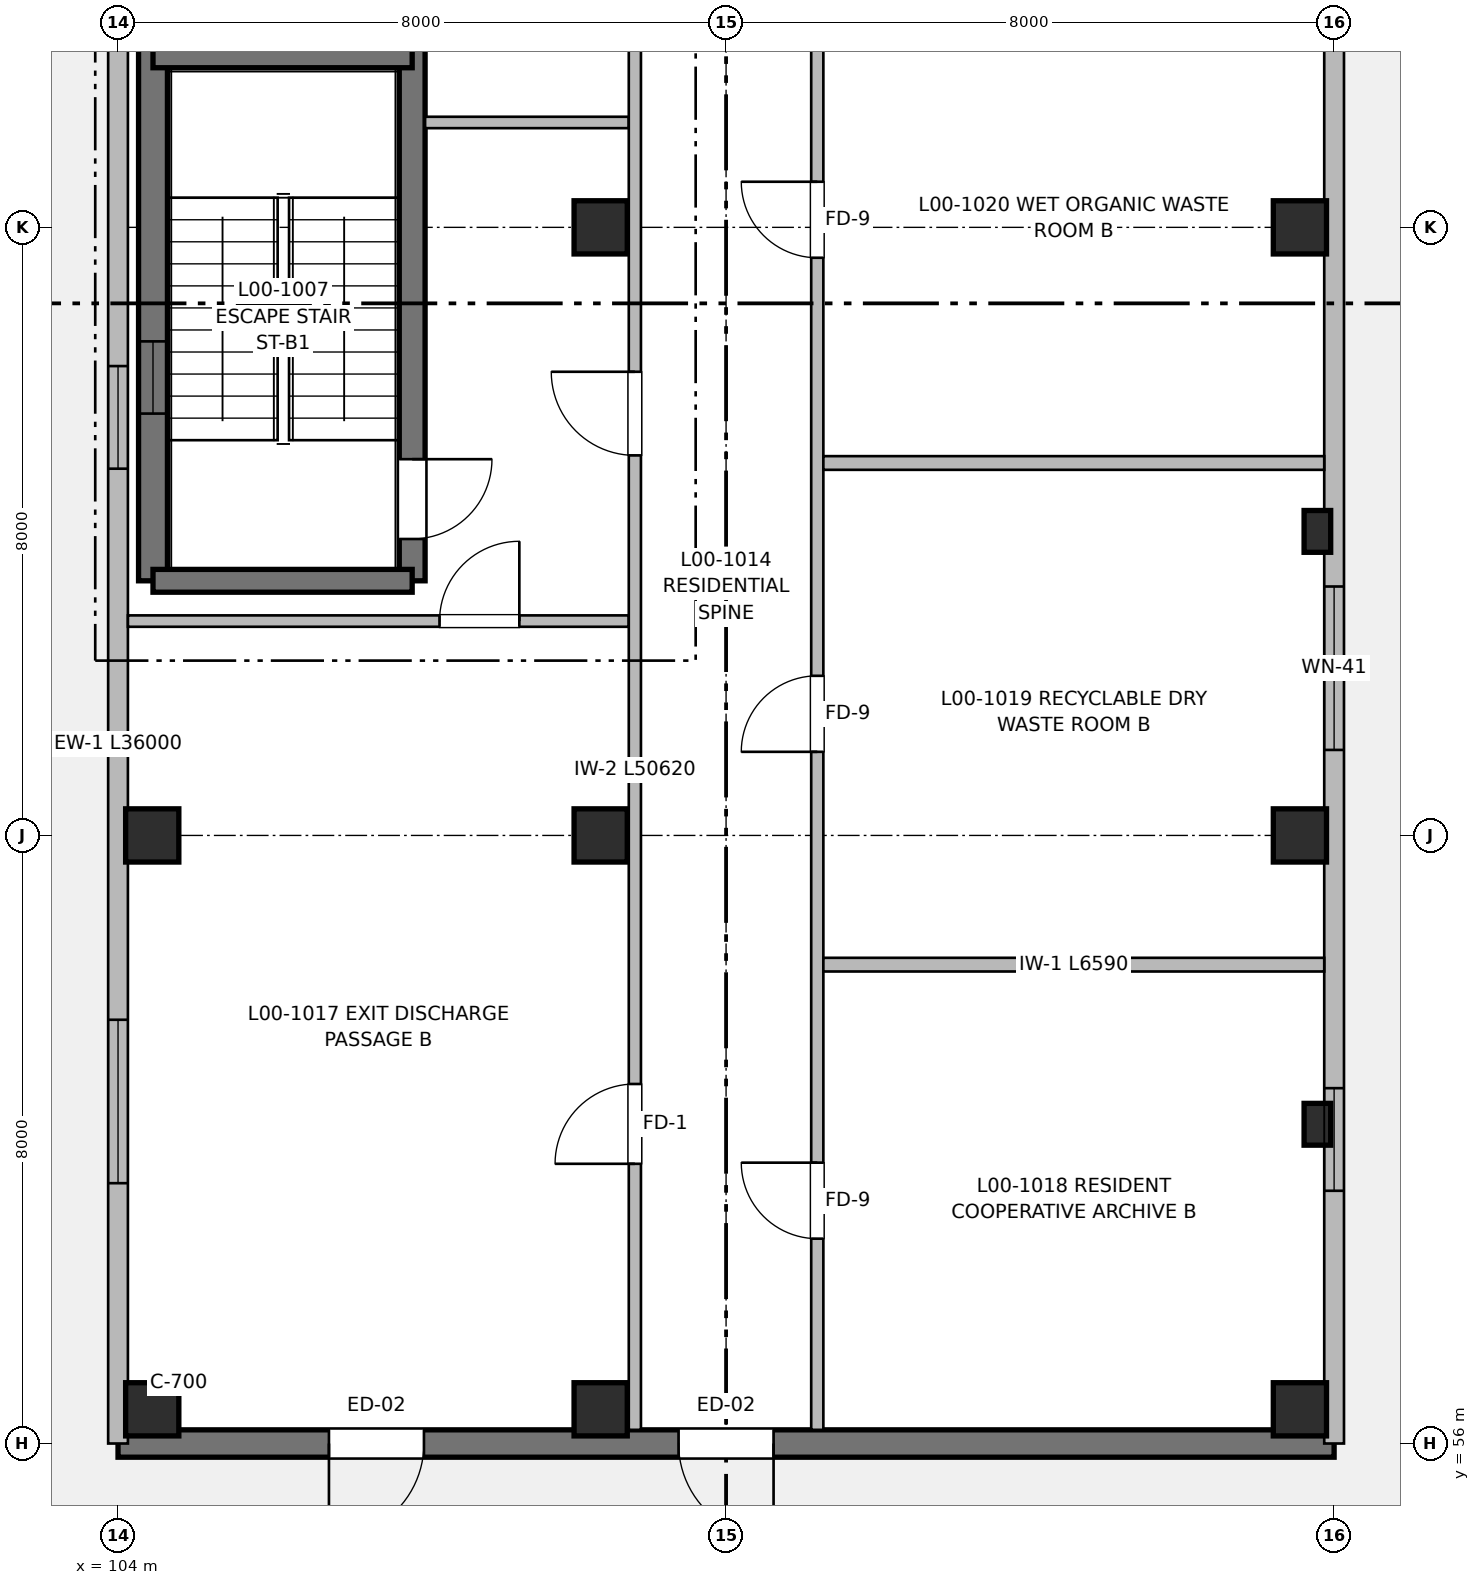
"""IFC4 building model, lengths in metres.
Left out: names, types, materials, properties, quantities, classifications, styles, units other than length and angle.
Written with IfcOpenShell. Run it as: python <this file> out.ifc"""

import sys

from ifc_helpers import new_model, si_unit, direction, frame, frame_2d, origin, origin_2d, place, context, subcontext, project, spatial, rectangle, extrude, element, fill, save


model = new_model("IFC4")
c1 = context("Model", 3, precision=1e-05, world=origin(), true_north=direction((0.0, 1.0)))
c2 = subcontext(c1, "Body", "Model", "MODEL_VIEW")
j1 = project(units=[si_unit("LENGTHUNIT", "METRE"), si_unit("PLANEANGLEUNIT", "RADIAN")], contexts=[c1])
p1 = place(None, origin())
s1 = spatial("IfcSite", under=j1, at=p1, CompositionType="ELEMENT")
p2 = place(p1, origin())
s2 = spatial("IfcBuilding", under=s1, at=p2, CompositionType="ELEMENT")
p3 = place(p2, origin())
s3 = spatial("IfcBuildingStorey", under=s2, at=p3, CompositionType="ELEMENT", Elevation=0.0)
for number, where, z_axis, x_axis in (
    (1, (104.45, 56.45, 0.0), (0.0, 0.0, 1.0), (1.0, 0.0, 0.0)),
    (2, (104.45, 64.0, 0.0), (0.0, 0.0, 1.0), (1.0, 0.0, 0.0)),
    (3, (110.35, 56.45, 0.0), (0.0, 0.0, 1.0), (1.0, 0.0, 0.0)),
    (4, (110.35, 64.0, 0.0), (0.0, 0.0, 1.0), (1.0, 0.0, 0.0)),
    (5, (110.35, 72.0, 0.0), (0.0, 0.0, 1.0), (1.0, 0.0, 0.0)),
    (6, (119.55, 56.45, 0.0), (0.0, 0.0, 1.0), (1.0, 0.0, 0.0)),
    (7, (119.55, 64.0, 0.0), (0.0, 0.0, 1.0), (1.0, 0.0, 0.0)),
    (8, (119.55, 72.0, 0.0), (0.0, 0.0, 1.0), (1.0, 0.0, 0.0)),
):
    element("IfcColumn", number, at=place(p3, frame(where, z_axis=z_axis, x_axis=x_axis)), inside=s3, PredefinedType="COLUMN", context=c2, shape_type="SweptSolid", body=[
        extrude(rectangle(XDim=0.7, YDim=0.7, at=origin_2d()), origin(), (0.0, 0.0, 1.0), 4.16),
    ])
for number, where, z_axis, x_axis in (
    (9, (119.78, 60.2, 0.0), (0.0, 0.0, 1.0), (1.0, 0.0, 0.0)),
    (10, (119.78, 68.0, 0.0), (0.0, 0.0, 1.0), (1.0, 0.0, 0.0)),
):
    element("IfcColumn", number, at=place(p3, frame(where, z_axis=z_axis, x_axis=x_axis)), inside=s3, PredefinedType="PILASTER", context=c2, shape_type="SweptSolid", body=[
        extrude(rectangle(XDim=0.35, YDim=0.55, at=origin_2d()), origin(), (0.0, 0.0, 1.0), 4.16),
    ])
p4 = place(p3, frame((104.46, 67.35, 0.0), z_axis=(0.0, 0.0, 1.0), x_axis=(0.0, 1.0, 0.0)))
e11 = element("IfcWall", 11, at=p4, inside=s3, PredefinedType="SHEAR", context=c2, shape_type="SweptSolid", body=[
    extrude(rectangle(XDim=12.45, YDim=0.38, at=frame_2d((6.225, 0.0))), origin(), (0.0, 0.0, 1.0), 4.16),
])
p5 = place(p4, frame((2.2, 0.0, 1.2)))
e12 = element("IfcOpeningElement", 12, at=p5, cuts=e11, PredefinedType="OPENING", context=c2, shape_type="SweptSolid", body=[
    extrude(rectangle(XDim=0.95, YDim=1.25, at=frame_2d((0.475, 0.625))), frame((0.0, 0.2, 0.0), z_axis=(0.0, -1.0, 0.0), x_axis=(1.0, 0.0, 0.0)), (0.0, 0.0, 1.0), 0.4),
])
p6 = place(p3, frame((107.87, 79.8, 0.0), z_axis=(0.0, 0.0, 1.0), x_axis=(0.0, -1.0, 0.0)))
e13 = element("IfcWall", 13, at=p6, inside=s3, PredefinedType="SHEAR", context=c2, shape_type="SweptSolid", body=[
    extrude(rectangle(XDim=12.45, YDim=0.34, at=frame_2d((6.225, 0.0))), origin(), (0.0, 0.0, 1.0), 4.16),
])
p7 = place(p6, frame((10.85, 0.0, 0.0)))
e14 = element("IfcOpeningElement", 14, at=p7, cuts=e13, PredefinedType="OPENING", context=c2, shape_type="SweptSolid", body=[
    extrude(rectangle(XDim=1.05, YDim=2.15, at=frame_2d((0.525, 1.075))), frame((0.0, 0.18, 0.0), z_axis=(0.0, -1.0, 0.0), x_axis=(1.0, 0.0, 0.0)), (0.0, 0.0, 1.0), 0.36),
])
p8 = place(p3, frame((107.87, 67.35, 0.0), z_axis=(0.0, 0.0, 1.0), x_axis=(-1.0, 0.0, 0.0)))
e15 = element("IfcWall", 15, at=p8, inside=s3, PredefinedType="SHEAR", context=c2, shape_type="SweptSolid", body=[
    extrude(rectangle(XDim=3.41, YDim=0.3, at=frame_2d((1.705, 0.0))), origin(), (0.0, 0.0, 1.0), 4.16),
])
p9 = place(p3, frame((104.46, 74.24, 0.0), z_axis=(0.0, 0.0, 1.0), x_axis=(1.0, 0.0, 0.0)))
e16 = element("IfcWall", 16, at=p9, inside=s3, PredefinedType="SHEAR", context=c2, shape_type="SweptSolid", body=[
    extrude(rectangle(XDim=3.41, YDim=0.28, at=frame_2d((1.705, 0.0))), origin(), (0.0, 0.0, 1.0), 4.16),
])
p10 = place(p3, frame((120.0, 56.0, 0.0), z_axis=(0.0, 0.0, 1.0), x_axis=(-1.0, 0.0, 0.0)))
e17 = element("IfcWall", 17, at=p10, inside=s3, PredefinedType="SHEAR", context=c2, shape_type="SweptSolid", body=[
    extrude(rectangle(XDim=16.0, YDim=0.36, at=frame_2d((8.0, 0.0))), origin(), (0.0, 0.0, 1.0), 3.94),
])
p11 = place(p10, frame((7.375, 0.0, 0.0)))
e18 = element("IfcOpeningElement", 18, at=p11, cuts=e17, PredefinedType="OPENING", context=c2, shape_type="SweptSolid", body=[
    extrude(rectangle(XDim=1.25, YDim=2.2, at=frame_2d((0.625, 1.1))), frame((0.0, 0.19, 0.0), z_axis=(0.0, -1.0, 0.0), x_axis=(1.0, 0.0, 0.0)), (0.0, 0.0, 1.0), 0.38),
])
p12 = place(p10, frame((11.975, 0.0, 0.0)))
e19 = element("IfcOpeningElement", 19, at=p12, cuts=e17, PredefinedType="OPENING", context=c2, shape_type="SweptSolid", body=[
    extrude(rectangle(XDim=1.25, YDim=2.2, at=frame_2d((0.625, 1.1))), frame((0.0, 0.19, 0.0), z_axis=(0.0, -1.0, 0.0), x_axis=(1.0, 0.0, 0.0)), (0.0, 0.0, 1.0), 0.38),
])
p13 = place(p3, frame((120.0, 88.0, 0.0), z_axis=(0.0, 0.0, 1.0), x_axis=(0.0, -1.0, 0.0)))
e20 = element("IfcWall", 20, at=p13, inside=s3, PredefinedType="SOLIDWALL", context=c2, shape_type="SweptSolid", body=[
    extrude(rectangle(XDim=32.0, YDim=0.26, at=frame_2d((16.0, 0.0))), origin(), (0.0, 0.0, 1.0), 3.94),
])
p14 = place(p13, frame((4.9, 0.0, 0.0)))
e21 = element("IfcOpeningElement", 21, at=p14, cuts=e20, PredefinedType="OPENING", context=c2, shape_type="SweptSolid", body=[
    extrude(rectangle(XDim=1.3, YDim=2.2, at=frame_2d((0.65, 1.1))), frame((0.0, 0.14, 0.0), z_axis=(0.0, -1.0, 0.0), x_axis=(1.0, 0.0, 0.0)), (0.0, 0.0, 1.0), 0.28),
])
p15 = place(p13, frame((10.025, 0.0, 0.95)))
e22 = element("IfcOpeningElement", 22, at=p15, cuts=e20, PredefinedType="OPENING", context=c2, shape_type="SweptSolid", body=[
    extrude(rectangle(XDim=1.35, YDim=1.3, at=frame_2d((0.675, 0.65))), frame((0.0, 0.14, 0.0), z_axis=(0.0, -1.0, 0.0), x_axis=(1.0, 0.0, 0.0)), (0.0, 0.0, 1.0), 0.28),
])
p16 = place(p13, frame((20.725, 0.0, 0.95)))
e23 = element("IfcOpeningElement", 23, at=p16, cuts=e20, PredefinedType="OPENING", context=c2, shape_type="SweptSolid", body=[
    extrude(rectangle(XDim=2.15, YDim=1.8, at=frame_2d((1.075, 0.9))), frame((0.0, 0.14, 0.0), z_axis=(0.0, -1.0, 0.0), x_axis=(1.0, 0.0, 0.0)), (0.0, 0.0, 1.0), 0.28),
])
p17 = place(p13, frame((27.325, 0.0, 0.95)))
e24 = element("IfcOpeningElement", 24, at=p17, cuts=e20, PredefinedType="OPENING", context=c2, shape_type="SweptSolid", body=[
    extrude(rectangle(XDim=1.35, YDim=1.3, at=frame_2d((0.675, 0.65))), frame((0.0, 0.14, 0.0), z_axis=(0.0, -1.0, 0.0), x_axis=(1.0, 0.0, 0.0)), (0.0, 0.0, 1.0), 0.28),
])
p18 = place(p3, frame((104.0, 56.0, 0.0), z_axis=(0.0, 0.0, 1.0), x_axis=(0.0, 1.0, 0.0)))
e25 = element("IfcWall", 25, at=p18, inside=s3, PredefinedType="SOLIDWALL", context=c2, shape_type="SweptSolid", body=[
    extrude(rectangle(XDim=36.0, YDim=0.26, at=frame_2d((18.0, 0.0))), origin(), (0.0, 0.0, 1.0), 3.94),
])
p19 = place(p18, frame((3.425, 0.0, 0.95)))
e26 = element("IfcOpeningElement", 26, at=p19, cuts=e25, PredefinedType="OPENING", context=c2, shape_type="SweptSolid", body=[
    extrude(rectangle(XDim=2.15, YDim=1.8, at=frame_2d((1.075, 0.9))), frame((0.0, 0.14, 0.0), z_axis=(0.0, -1.0, 0.0), x_axis=(1.0, 0.0, 0.0)), (0.0, 0.0, 1.0), 0.28),
])
p20 = place(p18, frame((12.825, 0.0, 0.95)))
e27 = element("IfcOpeningElement", 27, at=p20, cuts=e25, PredefinedType="OPENING", context=c2, shape_type="SweptSolid", body=[
    extrude(rectangle(XDim=1.35, YDim=1.3, at=frame_2d((0.675, 0.65))), frame((0.0, 0.14, 0.0), z_axis=(0.0, -1.0, 0.0), x_axis=(1.0, 0.0, 0.0)), (0.0, 0.0, 1.0), 0.28),
])
p21 = place(p18, frame((19.075, 0.0, 0.95)))
e28 = element("IfcOpeningElement", 28, at=p21, cuts=e25, PredefinedType="OPENING", context=c2, shape_type="SweptSolid", body=[
    extrude(rectangle(XDim=2.15, YDim=1.8, at=frame_2d((1.075, 0.9))), frame((0.0, 0.14, 0.0), z_axis=(0.0, -1.0, 0.0), x_axis=(1.0, 0.0, 0.0)), (0.0, 0.0, 1.0), 0.28),
])
p22 = place(p18, frame((30.825, 0.0, 0.95)))
e29 = element("IfcOpeningElement", 29, at=p22, cuts=e25, PredefinedType="OPENING", context=c2, shape_type="SweptSolid", body=[
    extrude(rectangle(XDim=1.35, YDim=1.3, at=frame_2d((0.675, 0.65))), frame((0.0, 0.14, 0.0), z_axis=(0.0, -1.0, 0.0), x_axis=(1.0, 0.0, 0.0)), (0.0, 0.0, 1.0), 0.28),
])
p23 = place(p3, frame((104.13, 66.82, 0.0), z_axis=(0.0, 0.0, 1.0), x_axis=(1.0, 0.0, 0.0)))
e30 = element("IfcWall", 30, at=p23, inside=s3, PredefinedType="PARTITIONING", context=c2, shape_type="SweptSolid", body=[
    extrude(rectangle(XDim=6.59, YDim=0.15, at=frame_2d((3.295, 0.0))), origin(), (0.0, 0.0, 1.0), 3.895),
])
p24 = place(p23, frame((4.1, 0.0, 0.0)))
e31 = element("IfcOpeningElement", 31, at=p24, cuts=e30, PredefinedType="OPENING", context=c2, shape_type="SweptSolid", body=[
    extrude(rectangle(XDim=1.05, YDim=2.15, at=frame_2d((0.525, 1.075))), frame((0.0, 0.085, 0.0), z_axis=(0.0, -1.0, 0.0), x_axis=(1.0, 0.0, 0.0)), (0.0, 0.0, 1.0), 0.17),
])
p25 = place(p3, frame((108.04, 73.38, 0.0), z_axis=(0.0, 0.0, 1.0), x_axis=(1.0, 0.0, 0.0)))
e32 = element("IfcWall", 32, at=p25, inside=s3, PredefinedType="PARTITIONING", context=c2, shape_type="SweptSolid", body=[
    extrude(rectangle(XDim=2.68, YDim=0.15, at=frame_2d((1.34, 0.0))), origin(), (0.0, 0.0, 1.0), 3.895),
])
p26 = place(p3, frame((110.8, 56.18, 0.0), z_axis=(0.0, 0.0, 1.0), x_axis=(0.0, 1.0, 0.0)))
e33 = element("IfcWall", 33, at=p26, inside=s3, PredefinedType="PARTITIONING", context=c2, shape_type="SweptSolid", body=[
    extrude(rectangle(XDim=50.62, YDim=0.16, at=frame_2d((25.31, 0.0))), origin(), (0.0, 0.0, 1.0), 3.895),
])
p27 = place(p26, frame((12.82, 0.0, 0.0)))
e34 = element("IfcOpeningElement", 34, at=p27, cuts=e33, PredefinedType="OPENING", context=c2, shape_type="SweptSolid", body=[
    extrude(rectangle(XDim=1.1, YDim=2.15, at=frame_2d((0.55, 1.075))), frame((0.0, 0.09, 0.0), z_axis=(0.0, -1.0, 0.0), x_axis=(1.0, 0.0, 0.0)), (0.0, 0.0, 1.0), 0.18),
])
p28 = place(p26, frame((19.22, 0.0, 0.0)))
e35 = element("IfcOpeningElement", 35, at=p28, cuts=e33, PredefinedType="OPENING", context=c2, shape_type="SweptSolid", body=[
    extrude(rectangle(XDim=1.6, YDim=2.15, at=frame_2d((0.8, 1.075))), frame((0.0, 0.09, 0.0), z_axis=(0.0, -1.0, 0.0), x_axis=(1.0, 0.0, 0.0)), (0.0, 0.0, 1.0), 0.18),
])
p29 = place(p26, frame((3.5, 0.0, 0.0)))
e36 = element("IfcOpeningElement", 36, at=p29, cuts=e33, PredefinedType="OPENING", context=c2, shape_type="SweptSolid", body=[
    extrude(rectangle(XDim=1.05, YDim=2.15, at=frame_2d((0.525, 1.075))), frame((0.0, 0.09, 0.0), z_axis=(0.0, -1.0, 0.0), x_axis=(1.0, 0.0, 0.0)), (0.0, 0.0, 1.0), 0.18),
])
p30 = place(p26, frame((29.2, 0.0, 0.0)))
e37 = element("IfcOpeningElement", 37, at=p30, cuts=e33, PredefinedType="OPENING", context=c2, shape_type="SweptSolid", body=[
    extrude(rectangle(XDim=1.55, YDim=2.2, at=frame_2d((0.775, 1.1))), frame((0.0, 0.09, 0.0), z_axis=(0.0, -1.0, 0.0), x_axis=(1.0, 0.0, 0.0)), (0.0, 0.0, 1.0), 0.18),
])
p31 = place(p3, frame((113.2, 56.18, 0.0), z_axis=(0.0, 0.0, 1.0), x_axis=(0.0, 1.0, 0.0)))
e38 = element("IfcWall", 38, at=p31, inside=s3, PredefinedType="PARTITIONING", context=c2, shape_type="SweptSolid", body=[
    extrude(rectangle(XDim=50.62, YDim=0.16, at=frame_2d((25.31, 0.0))), origin(), (0.0, 0.0, 1.0), 3.895),
])
p32 = place(p31, frame((2.515, 0.0, 0.0)))
e39 = element("IfcOpeningElement", 39, at=p32, cuts=e38, PredefinedType="OPENING", context=c2, shape_type="SweptSolid", body=[
    extrude(rectangle(XDim=1.0, YDim=2.1, at=frame_2d((0.5, 1.05))), frame((0.0, 0.09, 0.0), z_axis=(0.0, -1.0, 0.0), x_axis=(1.0, 0.0, 0.0)), (0.0, 0.0, 1.0), 0.18),
])
p33 = place(p31, frame((8.92, 0.0, 0.0)))
e40 = element("IfcOpeningElement", 40, at=p33, cuts=e38, PredefinedType="OPENING", context=c2, shape_type="SweptSolid", body=[
    extrude(rectangle(XDim=1.0, YDim=2.1, at=frame_2d((0.5, 1.05))), frame((0.0, 0.09, 0.0), z_axis=(0.0, -1.0, 0.0), x_axis=(1.0, 0.0, 0.0)), (0.0, 0.0, 1.0), 0.18),
])
p34 = place(p31, frame((15.42, 0.0, 0.0)))
e41 = element("IfcOpeningElement", 41, at=p34, cuts=e38, PredefinedType="OPENING", context=c2, shape_type="SweptSolid", body=[
    extrude(rectangle(XDim=1.0, YDim=2.1, at=frame_2d((0.5, 1.05))), frame((0.0, 0.09, 0.0), z_axis=(0.0, -1.0, 0.0), x_axis=(1.0, 0.0, 0.0)), (0.0, 0.0, 1.0), 0.18),
])
p35 = place(p31, frame((24.42, 0.0, 0.0)))
e42 = element("IfcOpeningElement", 42, at=p35, cuts=e38, PredefinedType="OPENING", context=c2, shape_type="SweptSolid", body=[
    extrude(rectangle(XDim=0.96, YDim=2.15, at=frame_2d((0.48, 1.075))), frame((0.0, 0.09, 0.0), z_axis=(0.0, -1.0, 0.0), x_axis=(1.0, 0.0, 0.0)), (0.0, 0.0, 1.0), 0.18),
])
p36 = place(p31, frame((40.175, 0.0, 0.0)))
e43 = element("IfcOpeningElement", 43, at=p36, cuts=e38, PredefinedType="OPENING", context=c2, shape_type="SweptSolid", body=[
    extrude(rectangle(XDim=1.04, YDim=2.15, at=frame_2d((0.52, 1.075))), frame((0.0, 0.09, 0.0), z_axis=(0.0, -1.0, 0.0), x_axis=(1.0, 0.0, 0.0)), (0.0, 0.0, 1.0), 0.18),
])
for number, where, z_axis, x_axis in (
    (44, (113.28, 62.3, 0.0), (0.0, 0.0, 1.0), (1.0, 0.0, 0.0)),
    (45, (113.28, 68.9, 0.0), (0.0, 0.0, 1.0), (1.0, 0.0, 0.0)),
):
    element("IfcWall", number, at=place(p3, frame(where, z_axis=z_axis, x_axis=x_axis)), inside=s3, PredefinedType="PARTITIONING", context=c2, shape_type="SweptSolid", body=[
        extrude(rectangle(XDim=6.59, YDim=0.18, at=frame_2d((3.295, 0.0))), origin(), (0.0, 0.0, 1.0), 3.895),
    ])
p37 = place(p7, origin())
e46 = element("IfcDoor", 46, at=p37, inside=s3, OperationType="SINGLE_SWING_LEFT", PredefinedType="DOOR", context=c2, shape_type="SweptSolid", body=[
    extrude(rectangle(XDim=1.05, YDim=2.15, at=frame_2d((0.525, 1.075))), frame((0.0, 0.025, 0.0), z_axis=(0.0, -1.0, 0.0), x_axis=(1.0, 0.0, 0.0)), (0.0, 0.0, 1.0), 0.05),
])
fill(e14, e46)
p38 = place(p5, origin())
e47 = element("IfcWindow", 47, at=p38, inside=s3, PartitioningType="SINGLE_PANEL", PredefinedType="WINDOW", context=c2, shape_type="SweptSolid", body=[
    extrude(rectangle(XDim=0.95, YDim=1.25, at=frame_2d((0.475, 0.625))), frame((0.0, 0.03, 0.0), z_axis=(0.0, -1.0, 0.0), x_axis=(1.0, 0.0, 0.0)), (0.0, 0.0, 1.0), 0.06),
])
fill(e12, e47)
p39 = place(p11, origin())
e48 = element("IfcDoor", 48, at=p39, inside=s3, OperationType="SINGLE_SWING_LEFT", PredefinedType="DOOR", context=c2, shape_type="SweptSolid", body=[
    extrude(rectangle(XDim=1.25, YDim=2.2, at=frame_2d((0.625, 1.1))), frame((0.0, 0.025, 0.0), z_axis=(0.0, -1.0, 0.0), x_axis=(1.0, 0.0, 0.0)), (0.0, 0.0, 1.0), 0.05),
])
fill(e18, e48)
p40 = place(p12, origin())
e49 = element("IfcDoor", 49, at=p40, inside=s3, OperationType="SINGLE_SWING_RIGHT", PredefinedType="DOOR", context=c2, shape_type="SweptSolid", body=[
    extrude(rectangle(XDim=1.25, YDim=2.2, at=frame_2d((0.625, 1.1))), frame((0.0, 0.025, 0.0), z_axis=(0.0, -1.0, 0.0), x_axis=(1.0, 0.0, 0.0)), (0.0, 0.0, 1.0), 0.05),
])
fill(e19, e49)
p41 = place(p16, origin())
e50 = element("IfcWindow", 50, at=p41, inside=s3, PartitioningType="SINGLE_PANEL", PredefinedType="WINDOW", context=c2, shape_type="SweptSolid", body=[
    extrude(rectangle(XDim=2.15, YDim=1.8, at=frame_2d((1.075, 0.9))), frame((0.0, 0.03, 0.0), z_axis=(0.0, -1.0, 0.0), x_axis=(1.0, 0.0, 0.0)), (0.0, 0.0, 1.0), 0.06),
])
fill(e23, e50)
p42 = place(p17, origin())
e51 = element("IfcWindow", 51, at=p42, inside=s3, PartitioningType="SINGLE_PANEL", PredefinedType="WINDOW", context=c2, shape_type="SweptSolid", body=[
    extrude(rectangle(XDim=1.35, YDim=1.3, at=frame_2d((0.675, 0.65))), frame((0.0, 0.03, 0.0), z_axis=(0.0, -1.0, 0.0), x_axis=(1.0, 0.0, 0.0)), (0.0, 0.0, 1.0), 0.06),
])
fill(e24, e51)
p43 = place(p19, origin())
e52 = element("IfcWindow", 52, at=p43, inside=s3, PartitioningType="SINGLE_PANEL", PredefinedType="WINDOW", context=c2, shape_type="SweptSolid", body=[
    extrude(rectangle(XDim=2.15, YDim=1.8, at=frame_2d((1.075, 0.9))), frame((0.0, 0.03, 0.0), z_axis=(0.0, -1.0, 0.0), x_axis=(1.0, 0.0, 0.0)), (0.0, 0.0, 1.0), 0.06),
])
fill(e26, e52)
p44 = place(p20, origin())
e53 = element("IfcWindow", 53, at=p44, inside=s3, PartitioningType="SINGLE_PANEL", PredefinedType="WINDOW", context=c2, shape_type="SweptSolid", body=[
    extrude(rectangle(XDim=1.35, YDim=1.3, at=frame_2d((0.675, 0.65))), frame((0.0, 0.03, 0.0), z_axis=(0.0, -1.0, 0.0), x_axis=(1.0, 0.0, 0.0)), (0.0, 0.0, 1.0), 0.06),
])
fill(e27, e53)
p45 = place(p27, origin())
e54 = element("IfcDoor", 54, at=p45, inside=s3, OperationType="SINGLE_SWING_RIGHT", PredefinedType="DOOR", context=c2, shape_type="SweptSolid", body=[
    extrude(rectangle(XDim=1.1, YDim=2.15, at=frame_2d((0.55, 1.075))), frame((0.0, 0.025, 0.0), z_axis=(0.0, -1.0, 0.0), x_axis=(1.0, 0.0, 0.0)), (0.0, 0.0, 1.0), 0.05),
])
fill(e34, e54)
p46 = place(p24, origin())
e55 = element("IfcDoor", 55, at=p46, inside=s3, OperationType="SINGLE_SWING_RIGHT", PredefinedType="DOOR", context=c2, shape_type="SweptSolid", body=[
    extrude(rectangle(XDim=1.05, YDim=2.15, at=frame_2d((0.525, 1.075))), frame((0.0, 0.025, 0.0), z_axis=(0.0, -1.0, 0.0), x_axis=(1.0, 0.0, 0.0)), (0.0, 0.0, 1.0), 0.05),
])
fill(e31, e55)
p47 = place(p29, origin())
e56 = element("IfcDoor", 56, at=p47, inside=s3, OperationType="SINGLE_SWING_LEFT", PredefinedType="DOOR", context=c2, shape_type="SweptSolid", body=[
    extrude(rectangle(XDim=1.05, YDim=2.15, at=frame_2d((0.525, 1.075))), frame((0.0, 0.025, 0.0), z_axis=(0.0, -1.0, 0.0), x_axis=(1.0, 0.0, 0.0)), (0.0, 0.0, 1.0), 0.05),
])
fill(e36, e56)
p48 = place(p32, origin())
e57 = element("IfcDoor", 57, at=p48, inside=s3, OperationType="SINGLE_SWING_RIGHT", PredefinedType="DOOR", context=c2, shape_type="SweptSolid", body=[
    extrude(rectangle(XDim=1.0, YDim=2.1, at=frame_2d((0.5, 1.05))), frame((0.0, 0.025, 0.0), z_axis=(0.0, -1.0, 0.0), x_axis=(1.0, 0.0, 0.0)), (0.0, 0.0, 1.0), 0.05),
])
fill(e39, e57)
p49 = place(p33, origin())
e58 = element("IfcDoor", 58, at=p49, inside=s3, OperationType="SINGLE_SWING_LEFT", PredefinedType="DOOR", context=c2, shape_type="SweptSolid", body=[
    extrude(rectangle(XDim=1.0, YDim=2.1, at=frame_2d((0.5, 1.05))), frame((0.0, 0.025, 0.0), z_axis=(0.0, -1.0, 0.0), x_axis=(1.0, 0.0, 0.0)), (0.0, 0.0, 1.0), 0.05),
])
fill(e40, e58)
p50 = place(p34, origin())
e59 = element("IfcDoor", 59, at=p50, inside=s3, OperationType="SINGLE_SWING_RIGHT", PredefinedType="DOOR", context=c2, shape_type="SweptSolid", body=[
    extrude(rectangle(XDim=1.0, YDim=2.1, at=frame_2d((0.5, 1.05))), frame((0.0, 0.025, 0.0), z_axis=(0.0, -1.0, 0.0), x_axis=(1.0, 0.0, 0.0)), (0.0, 0.0, 1.0), 0.05),
])
fill(e41, e59)
save(model, sys.argv[1])
